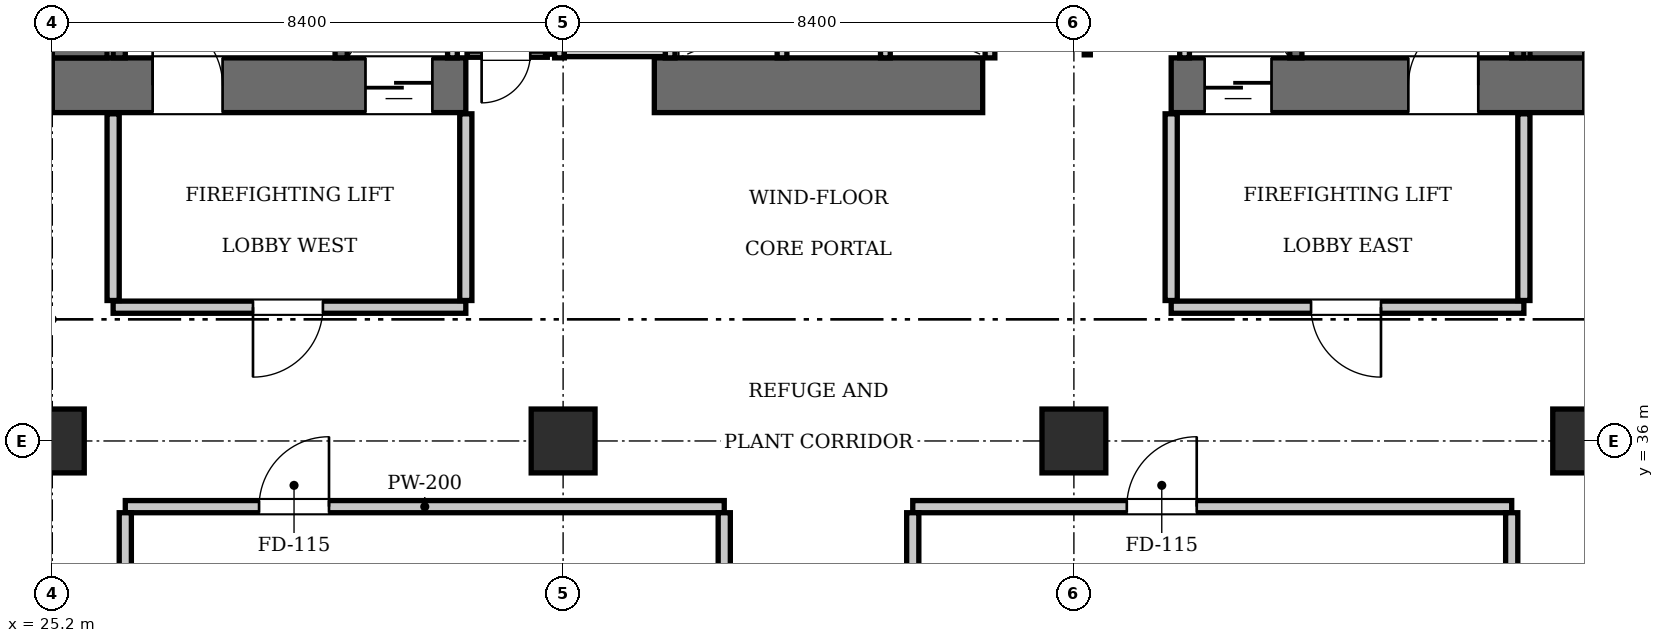
"""IFC4 building model, lengths in metres.
Left out: names, types, materials, properties, quantities, classifications, styles, units other than length and angle.
Written with IfcOpenShell. Run it as: python <this file> out.ifc"""

import sys

from ifc_helpers import new_model, si_unit, direction, frame, frame_2d, origin, origin_2d, place, context, subcontext, project, spatial, rectangle, extrude, element, fill, save


model = new_model("IFC4")
c1 = context("Model", 3, precision=1e-05, world=origin(), true_north=direction((0.0, 1.0)))
c2 = subcontext(c1, "Body", "Model", "MODEL_VIEW")
j1 = project(units=[si_unit("LENGTHUNIT", "METRE"), si_unit("PLANEANGLEUNIT", "RADIAN")], contexts=[c1])
p1 = place(None, origin())
s1 = spatial("IfcSite", under=j1, at=p1, CompositionType="ELEMENT")
p2 = place(p1, origin())
s2 = spatial("IfcBuilding", under=s1, at=p2, CompositionType="ELEMENT")
p3 = place(p2, frame((0.0, 0.0, 115.5)))
s3 = spatial("IfcBuildingStorey", under=s2, at=p3, CompositionType="ELEMENT", Elevation=115.5)
p4 = place(p3, frame((25.2, 41.85, 0.0), z_axis=(0.0, 0.0, 1.0), x_axis=(1.0, 0.0, 0.0)))
e1 = element("IfcWall", 1, at=p4, inside=s3, PredefinedType="SHEAR", context=c2, shape_type="SweptSolid", body=[
    extrude(rectangle(XDim=6.8, YDim=0.9, at=frame_2d((3.4, 0.0))), origin(), (0.0, 0.0, 1.0), 7.0),
])
p5 = place(p4, frame((1.65, 0.0, 0.0)))
e2 = element("IfcOpeningElement", 2, at=p5, cuts=e1, PredefinedType="OPENING", context=c2, shape_type="SweptSolid", body=[
    extrude(rectangle(XDim=1.15, YDim=2.15, at=frame_2d((0.575, 1.075))), frame((0.0, 0.46, 0.0), z_axis=(0.0, -1.0, 0.0), x_axis=(1.0, 0.0, 0.0)), (0.0, 0.0, 1.0), 0.92),
])
p6 = place(p4, frame((5.15, 0.0, 0.0)))
e3 = element("IfcOpeningElement", 3, at=p6, cuts=e1, PredefinedType="OPENING", context=c2, shape_type="SweptSolid", body=[
    extrude(rectangle(XDim=1.1, YDim=2.2, at=frame_2d((0.55, 1.1))), frame((0.0, 0.46, 0.0), z_axis=(0.0, -1.0, 0.0), x_axis=(1.0, 0.0, 0.0)), (0.0, 0.0, 1.0), 0.92),
])
p7 = place(p3, frame((35.1, 41.85, 0.0), z_axis=(0.0, 0.0, 1.0), x_axis=(1.0, 0.0, 0.0)))
e4 = element("IfcWall", 4, at=p7, inside=s3, PredefinedType="SHEAR", context=c2, shape_type="SweptSolid", body=[
    extrude(rectangle(XDim=5.4, YDim=0.9, at=frame_2d((2.7, 0.0))), origin(), (0.0, 0.0, 1.0), 7.0),
])
p8 = place(p3, frame((43.6, 41.85, 0.0), z_axis=(0.0, 0.0, 1.0), x_axis=(1.0, 0.0, 0.0)))
e5 = element("IfcWall", 5, at=p8, inside=s3, PredefinedType="SHEAR", context=c2, shape_type="SweptSolid", body=[
    extrude(rectangle(XDim=6.8, YDim=0.9, at=frame_2d((3.4, 0.0))), origin(), (0.0, 0.0, 1.0), 7.0),
])
p9 = place(p8, frame((3.9, 0.0, 0.0)))
e6 = element("IfcOpeningElement", 6, at=p9, cuts=e5, PredefinedType="OPENING", context=c2, shape_type="SweptSolid", body=[
    extrude(rectangle(XDim=1.15, YDim=2.15, at=frame_2d((0.575, 1.075))), frame((0.0, 0.46, 0.0), z_axis=(0.0, -1.0, 0.0), x_axis=(1.0, 0.0, 0.0)), (0.0, 0.0, 1.0), 0.92),
])
p10 = place(p8, frame((0.55, 0.0, 0.0)))
e7 = element("IfcOpeningElement", 7, at=p10, cuts=e5, PredefinedType="OPENING", context=c2, shape_type="SweptSolid", body=[
    extrude(rectangle(XDim=1.1, YDim=2.2, at=frame_2d((0.55, 1.1))), frame((0.0, 0.46, 0.0), z_axis=(0.0, -1.0, 0.0), x_axis=(1.0, 0.0, 0.0)), (0.0, 0.0, 1.0), 0.92),
])
for number, where, z_axis, x_axis in (
    (8, (25.65, 42.3, 0.0), (0.0, 0.0, 1.0), (0.0, 1.0, 0.0)),
    (9, (49.95, 42.3, 0.0), (0.0, 0.0, 1.0), (0.0, 1.0, 0.0)),
):
    element("IfcWall", number, at=place(p3, frame(where, z_axis=z_axis, x_axis=x_axis)), inside=s3, PredefinedType="SHEAR", context=c2, shape_type="SweptSolid", body=[
        extrude(rectangle(XDim=1.6, YDim=0.9, at=frame_2d((0.8, 0.0))), origin(), (0.0, 0.0, 1.0), 7.0),
    ])
for number, where, z_axis, x_axis in (
    (10, (25.2, 36.0, 0.0), (0.0, 0.0, 1.0), (1.0, 0.0, 0.0)),
    (11, (33.6, 36.0, 0.0), (0.0, 0.0, 1.0), (1.0, 0.0, 0.0)),
    (12, (42.0, 36.0, 0.0), (0.0, 0.0, 1.0), (1.0, 0.0, 0.0)),
    (13, (50.4, 36.0, 0.0), (0.0, 0.0, 1.0), (1.0, 0.0, 0.0)),
):
    element("IfcColumn", number, at=place(p3, frame(where, z_axis=z_axis, x_axis=x_axis)), inside=s3, PredefinedType="COLUMN", context=c2, shape_type="SweptSolid", body=[
        extrude(rectangle(XDim=1.05, YDim=1.05, at=origin_2d()), origin(), (0.0, 0.0, 1.0), 7.0),
    ])
p11 = place(p3, frame((29.95, 42.3, 0.0), z_axis=(0.0, 0.0, 1.0), x_axis=(0.0, 1.0, 0.0)))
e14 = element("IfcWall", 14, at=p11, inside=s3, PredefinedType="SOLIDWALL", context=c2, shape_type="SweptSolid", body=[
    extrude(rectangle(XDim=8.85, YDim=0.2, at=frame_2d((4.425, 0.0))), origin(), (0.0, 0.0, 1.0), 6.76),
])
p12 = place(p3, frame((26.3, 42.3, 0.0), z_axis=(0.0, 0.0, 1.0), x_axis=(0.0, 1.0, 0.0)))
e15 = element("IfcWall", 15, at=p12, inside=s3, PredefinedType="SOLIDWALL", context=c2, shape_type="SweptSolid", body=[
    extrude(rectangle(XDim=1.58, YDim=0.2, at=frame_2d((0.79, 0.0))), origin(), (0.0, 0.0, 1.0), 6.76),
])
p13 = place(p3, frame((45.65, 42.3, 0.0), z_axis=(0.0, 0.0, 1.0), x_axis=(0.0, 1.0, 0.0)))
e16 = element("IfcWall", 16, at=p13, inside=s3, PredefinedType="SOLIDWALL", context=c2, shape_type="SweptSolid", body=[
    extrude(rectangle(XDim=8.85, YDim=0.2, at=frame_2d((4.425, 0.0))), origin(), (0.0, 0.0, 1.0), 6.76),
])
p14 = place(p3, frame((49.3, 42.3, 0.0), z_axis=(0.0, 0.0, 1.0), x_axis=(0.0, 1.0, 0.0)))
e17 = element("IfcWall", 17, at=p14, inside=s3, PredefinedType="SOLIDWALL", context=c2, shape_type="SweptSolid", body=[
    extrude(rectangle(XDim=1.58, YDim=0.2, at=frame_2d((0.79, 0.0))), origin(), (0.0, 0.0, 1.0), 6.76),
])
for number, where, z_axis, x_axis in (
    (18, (31.78, 42.3, 0.0), (0.0, 0.0, 1.0), (0.0, 1.0, 0.0)),
    (19, (43.82, 42.3, 0.0), (0.0, 0.0, 1.0), (0.0, 1.0, 0.0)),
):
    element("IfcWall", number, at=place(p3, frame(where, z_axis=z_axis, x_axis=x_axis)), inside=s3, PredefinedType="SOLIDWALL", context=c2, shape_type="SweptSolid", body=[
        extrude(rectangle(XDim=2.44, YDim=0.16, at=frame_2d((1.22, 0.0))), origin(), (0.0, 0.0, 1.0), 6.76),
    ])
for number, where, z_axis, x_axis in (
    (20, (37.2, 42.3, 0.0), (0.0, 0.0, 1.0), (0.0, 1.0, 0.0)),
    (21, (38.9, 42.3, 0.0), (0.0, 0.0, 1.0), (0.0, 1.0, 0.0)),
    (22, (40.62, 42.3, 0.0), (0.0, 0.0, 1.0), (0.0, 1.0, 0.0)),
):
    element("IfcWall", number, at=place(p3, frame(where, z_axis=z_axis, x_axis=x_axis)), inside=s3, PredefinedType="SOLIDWALL", context=c2, shape_type="SweptSolid", body=[
        extrude(rectangle(XDim=2.05, YDim=0.16, at=frame_2d((1.025, 0.0))), origin(), (0.0, 0.0, 1.0), 6.76),
    ])
for number, where, z_axis, x_axis in (
    (23, (33.54, 42.3, 0.0), (0.0, 0.0, 1.0), (0.0, 1.0, 0.0)),
    (24, (35.36, 42.3, 0.0), (0.0, 0.0, 1.0), (0.0, 1.0, 0.0)),
):
    element("IfcWall", number, at=place(p3, frame(where, z_axis=z_axis, x_axis=x_axis)), inside=s3, PredefinedType="SOLIDWALL", context=c2, shape_type="SweptSolid", body=[
        extrude(rectangle(XDim=2.1, YDim=0.16, at=frame_2d((1.05, 0.0))), origin(), (0.0, 0.0, 1.0), 6.76),
    ])
p15 = place(p3, frame((33.62, 42.4, 0.0), z_axis=(0.0, 0.0, 1.0), x_axis=(1.0, 0.0, 0.0)))
e25 = element("IfcWall", 25, at=p15, inside=s3, PredefinedType="SOLIDWALL", context=c2, shape_type="SweptSolid", body=[
    extrude(rectangle(XDim=1.66, YDim=0.16, at=frame_2d((0.83, 0.0))), origin(), (0.0, 0.0, 1.0), 6.76),
])
p16 = place(p3, frame((26.2, 38.2, 0.0), z_axis=(0.0, 0.0, 1.0), x_axis=(1.0, 0.0, 0.0)))
e26 = element("IfcWall", 26, at=p16, inside=s3, PredefinedType="PARTITIONING", context=c2, shape_type="SweptSolid", body=[
    extrude(rectangle(XDim=5.8, YDim=0.2, at=frame_2d((2.9, 0.0))), origin(), (0.0, 0.0, 1.0), 6.76),
])
p17 = place(p16, frame((2.3, 0.0, 0.0)))
e27 = element("IfcOpeningElement", 27, at=p17, cuts=e26, PredefinedType="OPENING", context=c2, shape_type="SweptSolid", body=[
    extrude(rectangle(XDim=1.15, YDim=2.15, at=frame_2d((0.575, 1.075))), frame((0.0, 0.11, 0.0), z_axis=(0.0, -1.0, 0.0), x_axis=(1.0, 0.0, 0.0)), (0.0, 0.0, 1.0), 0.22),
])
for number, where, z_axis, x_axis in (
    (28, (26.2, 38.31, 0.0), (0.0, 0.0, 1.0), (0.0, 1.0, 0.0)),
    (29, (32.0, 38.31, 0.0), (0.0, 0.0, 1.0), (0.0, 1.0, 0.0)),
):
    element("IfcWall", number, at=place(p3, frame(where, z_axis=z_axis, x_axis=x_axis)), inside=s3, PredefinedType="PARTITIONING", context=c2, shape_type="SweptSolid", body=[
        extrude(rectangle(XDim=3.07, YDim=0.2, at=frame_2d((1.535, 0.0))), origin(), (0.0, 0.0, 1.0), 6.76),
    ])
p18 = place(p3, frame((43.6, 38.2, 0.0), z_axis=(0.0, 0.0, 1.0), x_axis=(1.0, 0.0, 0.0)))
e30 = element("IfcWall", 30, at=p18, inside=s3, PredefinedType="PARTITIONING", context=c2, shape_type="SweptSolid", body=[
    extrude(rectangle(XDim=5.8, YDim=0.2, at=frame_2d((2.9, 0.0))), origin(), (0.0, 0.0, 1.0), 6.76),
])
p19 = place(p18, frame((2.3, 0.0, 0.0)))
e31 = element("IfcOpeningElement", 31, at=p19, cuts=e30, PredefinedType="OPENING", context=c2, shape_type="SweptSolid", body=[
    extrude(rectangle(XDim=1.15, YDim=2.15, at=frame_2d((0.575, 1.075))), frame((0.0, 0.11, 0.0), z_axis=(0.0, -1.0, 0.0), x_axis=(1.0, 0.0, 0.0)), (0.0, 0.0, 1.0), 0.22),
])
for number, where, z_axis, x_axis in (
    (32, (43.6, 38.31, 0.0), (0.0, 0.0, 1.0), (0.0, 1.0, 0.0)),
    (33, (49.4, 38.31, 0.0), (0.0, 0.0, 1.0), (0.0, 1.0, 0.0)),
):
    element("IfcWall", number, at=place(p3, frame(where, z_axis=z_axis, x_axis=x_axis)), inside=s3, PredefinedType="PARTITIONING", context=c2, shape_type="SweptSolid", body=[
        extrude(rectangle(XDim=3.07, YDim=0.2, at=frame_2d((1.535, 0.0))), origin(), (0.0, 0.0, 1.0), 6.76),
    ])
p20 = place(p3, frame((32.02, 42.36, 0.0), z_axis=(0.0, 0.0, 1.0), x_axis=(1.0, 0.0, 0.0)))
e34 = element("IfcWall", 34, at=p20, inside=s3, PredefinedType="PARTITIONING", context=c2, shape_type="SweptSolid", body=[
    extrude(rectangle(XDim=1.32, YDim=0.1, at=frame_2d((0.66, 0.0))), origin(), (0.0, 0.0, 1.0), 6.76),
])
p21 = place(p20, frame((0.24, 0.0, 0.0)))
e35 = element("IfcOpeningElement", 35, at=p21, cuts=e34, PredefinedType="OPENING", context=c2, shape_type="SweptSolid", body=[
    extrude(rectangle(XDim=0.8, YDim=2.05, at=frame_2d((0.4, 1.025))), frame((0.0, 0.06, 0.0), z_axis=(0.0, -1.0, 0.0), x_axis=(1.0, 0.0, 0.0)), (0.0, 0.0, 1.0), 0.12),
])
p22 = place(p3, frame((33.36, 42.36, 0.0), z_axis=(0.0, 0.0, 1.0), x_axis=(0.0, 1.0, 0.0)))
e36 = element("IfcWall", 36, at=p22, inside=s3, PredefinedType="PARTITIONING", context=c2, shape_type="SweptSolid", body=[
    extrude(rectangle(XDim=2.58, YDim=0.1, at=frame_2d((1.29, 0.0))), origin(), (0.0, 0.0, 1.0), 6.76),
])
p23 = place(p3, frame((42.22, 42.35, 0.0), z_axis=(0.0, 0.0, 1.0), x_axis=(0.0, 1.0, 0.0)))
e37 = element("IfcWall", 37, at=p23, inside=s3, PredefinedType="PARTITIONING", context=c2, shape_type="SweptSolid", body=[
    extrude(rectangle(XDim=2.61, YDim=0.1, at=frame_2d((1.305, 0.0))), origin(), (0.0, 0.0, 1.0), 6.76),
])
p24 = place(p23, frame((0.65, 0.0, 0.0)))
e38 = element("IfcOpeningElement", 38, at=p24, cuts=e37, PredefinedType="OPENING", context=c2, shape_type="SweptSolid", body=[
    extrude(rectangle(XDim=0.8, YDim=2.05, at=frame_2d((0.4, 1.025))), frame((0.0, 0.06, 0.0), z_axis=(0.0, -1.0, 0.0), x_axis=(1.0, 0.0, 0.0)), (0.0, 0.0, 1.0), 0.12),
])
p25 = place(p3, frame((26.4, 34.92, 0.0), z_axis=(0.0, 0.0, 1.0), x_axis=(1.0, 0.0, 0.0)))
e39 = element("IfcWall", 39, at=p25, inside=s3, PredefinedType="PARTITIONING", context=c2, shape_type="SweptSolid", body=[
    extrude(rectangle(XDim=9.85, YDim=0.2, at=frame_2d((4.925, 0.0))), origin(), (0.0, 0.0, 1.0), 6.76),
])
p26 = place(p25, frame((2.2, 0.0, 0.0)))
e40 = element("IfcOpeningElement", 40, at=p26, cuts=e39, PredefinedType="OPENING", context=c2, shape_type="SweptSolid", body=[
    extrude(rectangle(XDim=1.15, YDim=2.15, at=frame_2d((0.575, 1.075))), frame((0.0, 0.11, 0.0), z_axis=(0.0, -1.0, 0.0), x_axis=(1.0, 0.0, 0.0)), (0.0, 0.0, 1.0), 0.22),
])
p27 = place(p3, frame((26.4, 14.3, 0.0), z_axis=(0.0, 0.0, 1.0), x_axis=(0.0, 1.0, 0.0)))
e41 = element("IfcWall", 41, at=p27, inside=s3, PredefinedType="PARTITIONING", context=c2, shape_type="SweptSolid", body=[
    extrude(rectangle(XDim=20.52, YDim=0.2, at=frame_2d((10.26, 0.0))), origin(), (0.0, 0.0, 1.0), 6.76),
])
p28 = place(p3, frame((36.25, 28.45, 0.0), z_axis=(0.0, 0.0, 1.0), x_axis=(0.0, 1.0, 0.0)))
e42 = element("IfcWall", 42, at=p28, inside=s3, PredefinedType="PARTITIONING", context=c2, shape_type="SweptSolid", body=[
    extrude(rectangle(XDim=6.37, YDim=0.2, at=frame_2d((3.185, 0.0))), origin(), (0.0, 0.0, 1.0), 6.76),
])
p29 = place(p3, frame((39.35, 34.92, 0.0), z_axis=(0.0, 0.0, 1.0), x_axis=(1.0, 0.0, 0.0)))
e43 = element("IfcWall", 43, at=p29, inside=s3, PredefinedType="PARTITIONING", context=c2, shape_type="SweptSolid", body=[
    extrude(rectangle(XDim=9.85, YDim=0.2, at=frame_2d((4.925, 0.0))), origin(), (0.0, 0.0, 1.0), 6.76),
])
p30 = place(p29, frame((3.52, 0.0, 0.0)))
e44 = element("IfcOpeningElement", 44, at=p30, cuts=e43, PredefinedType="OPENING", context=c2, shape_type="SweptSolid", body=[
    extrude(rectangle(XDim=1.15, YDim=2.15, at=frame_2d((0.575, 1.075))), frame((0.0, 0.11, 0.0), z_axis=(0.0, -1.0, 0.0), x_axis=(1.0, 0.0, 0.0)), (0.0, 0.0, 1.0), 0.22),
])
p31 = place(p3, frame((49.2, 14.3, 0.0), z_axis=(0.0, 0.0, 1.0), x_axis=(0.0, 1.0, 0.0)))
e45 = element("IfcWall", 45, at=p31, inside=s3, PredefinedType="PARTITIONING", context=c2, shape_type="SweptSolid", body=[
    extrude(rectangle(XDim=20.52, YDim=0.2, at=frame_2d((10.26, 0.0))), origin(), (0.0, 0.0, 1.0), 6.76),
])
p32 = place(p3, frame((39.35, 28.45, 0.0), z_axis=(0.0, 0.0, 1.0), x_axis=(0.0, 1.0, 0.0)))
e46 = element("IfcWall", 46, at=p32, inside=s3, PredefinedType="PARTITIONING", context=c2, shape_type="SweptSolid", body=[
    extrude(rectangle(XDim=6.37, YDim=0.2, at=frame_2d((3.185, 0.0))), origin(), (0.0, 0.0, 1.0), 6.76),
])
p33 = place(p5, origin())
e47 = element("IfcDoor", 47, at=p33, inside=s3, OperationType="SINGLE_SWING_LEFT", PredefinedType="DOOR", context=c2, shape_type="SweptSolid", body=[
    extrude(rectangle(XDim=1.15, YDim=2.15, at=frame_2d((0.575, 1.075))), frame((0.0, 0.025, 0.0), z_axis=(0.0, -1.0, 0.0), x_axis=(1.0, 0.0, 0.0)), (0.0, 0.0, 1.0), 0.05),
])
fill(e2, e47)
p34 = place(p9, origin())
e48 = element("IfcDoor", 48, at=p34, inside=s3, OperationType="SINGLE_SWING_RIGHT", PredefinedType="DOOR", context=c2, shape_type="SweptSolid", body=[
    extrude(rectangle(XDim=1.15, YDim=2.15, at=frame_2d((0.575, 1.075))), frame((0.0, 0.025, 0.0), z_axis=(0.0, -1.0, 0.0), x_axis=(1.0, 0.0, 0.0)), (0.0, 0.0, 1.0), 0.05),
])
fill(e6, e48)
p35 = place(p6, frame((1.1, 0.0, 0.0), z_axis=(0.0, 0.0, 1.0), x_axis=(-1.0, 0.0, 0.0)))
e49 = element("IfcDoor", 49, at=p35, inside=s3, OperationType="SLIDING_TO_LEFT", PredefinedType="DOOR", context=c2, shape_type="SweptSolid", body=[
    extrude(rectangle(XDim=1.1, YDim=2.2, at=frame_2d((0.55, 1.1))), frame((0.0, 0.025, 0.0), z_axis=(0.0, -1.0, 0.0), x_axis=(1.0, 0.0, 0.0)), (0.0, 0.0, 1.0), 0.05),
])
fill(e3, e49)
p36 = place(p10, frame((1.1, 0.0, 0.0), z_axis=(0.0, 0.0, 1.0), x_axis=(-1.0, 0.0, 0.0)))
e50 = element("IfcDoor", 50, at=p36, inside=s3, OperationType="SLIDING_TO_LEFT", PredefinedType="DOOR", context=c2, shape_type="SweptSolid", body=[
    extrude(rectangle(XDim=1.1, YDim=2.2, at=frame_2d((0.55, 1.1))), frame((0.0, 0.025, 0.0), z_axis=(0.0, -1.0, 0.0), x_axis=(1.0, 0.0, 0.0)), (0.0, 0.0, 1.0), 0.05),
])
fill(e7, e50)
p37 = place(p17, frame((1.15, 0.0, 0.0), z_axis=(0.0, 0.0, 1.0), x_axis=(-1.0, 0.0, 0.0)))
e51 = element("IfcDoor", 51, at=p37, inside=s3, OperationType="SINGLE_SWING_RIGHT", PredefinedType="DOOR", context=c2, shape_type="SweptSolid", body=[
    extrude(rectangle(XDim=1.15, YDim=2.15, at=frame_2d((0.575, 1.075))), frame((0.0, 0.025, 0.0), z_axis=(0.0, -1.0, 0.0), x_axis=(1.0, 0.0, 0.0)), (0.0, 0.0, 1.0), 0.05),
])
fill(e27, e51)
p38 = place(p19, frame((1.15, 0.0, 0.0), z_axis=(0.0, 0.0, 1.0), x_axis=(-1.0, 0.0, 0.0)))
e52 = element("IfcDoor", 52, at=p38, inside=s3, OperationType="SINGLE_SWING_LEFT", PredefinedType="DOOR", context=c2, shape_type="SweptSolid", body=[
    extrude(rectangle(XDim=1.15, YDim=2.15, at=frame_2d((0.575, 1.075))), frame((0.0, 0.025, 0.0), z_axis=(0.0, -1.0, 0.0), x_axis=(1.0, 0.0, 0.0)), (0.0, 0.0, 1.0), 0.05),
])
fill(e31, e52)
p39 = place(p21, frame((0.8, 0.0, 0.0), z_axis=(0.0, 0.0, 1.0), x_axis=(-1.0, 0.0, 0.0)))
e53 = element("IfcDoor", 53, at=p39, inside=s3, OperationType="SINGLE_SWING_RIGHT", PredefinedType="DOOR", context=c2, shape_type="SweptSolid", body=[
    extrude(rectangle(XDim=0.8, YDim=2.05, at=frame_2d((0.4, 1.025))), frame((0.0, 0.025, 0.0), z_axis=(0.0, -1.0, 0.0), x_axis=(1.0, 0.0, 0.0)), (0.0, 0.0, 1.0), 0.05),
])
fill(e35, e53)
p40 = place(p26, origin())
e54 = element("IfcDoor", 54, at=p40, inside=s3, OperationType="SINGLE_SWING_RIGHT", PredefinedType="DOOR", context=c2, shape_type="SweptSolid", body=[
    extrude(rectangle(XDim=1.15, YDim=2.15, at=frame_2d((0.575, 1.075))), frame((0.0, 0.025, 0.0), z_axis=(0.0, -1.0, 0.0), x_axis=(1.0, 0.0, 0.0)), (0.0, 0.0, 1.0), 0.05),
])
fill(e40, e54)
p41 = place(p30, origin())
e55 = element("IfcDoor", 55, at=p41, inside=s3, OperationType="SINGLE_SWING_RIGHT", PredefinedType="DOOR", context=c2, shape_type="SweptSolid", body=[
    extrude(rectangle(XDim=1.15, YDim=2.15, at=frame_2d((0.575, 1.075))), frame((0.0, 0.025, 0.0), z_axis=(0.0, -1.0, 0.0), x_axis=(1.0, 0.0, 0.0)), (0.0, 0.0, 1.0), 0.05),
])
fill(e44, e55)
save(model, sys.argv[1])
